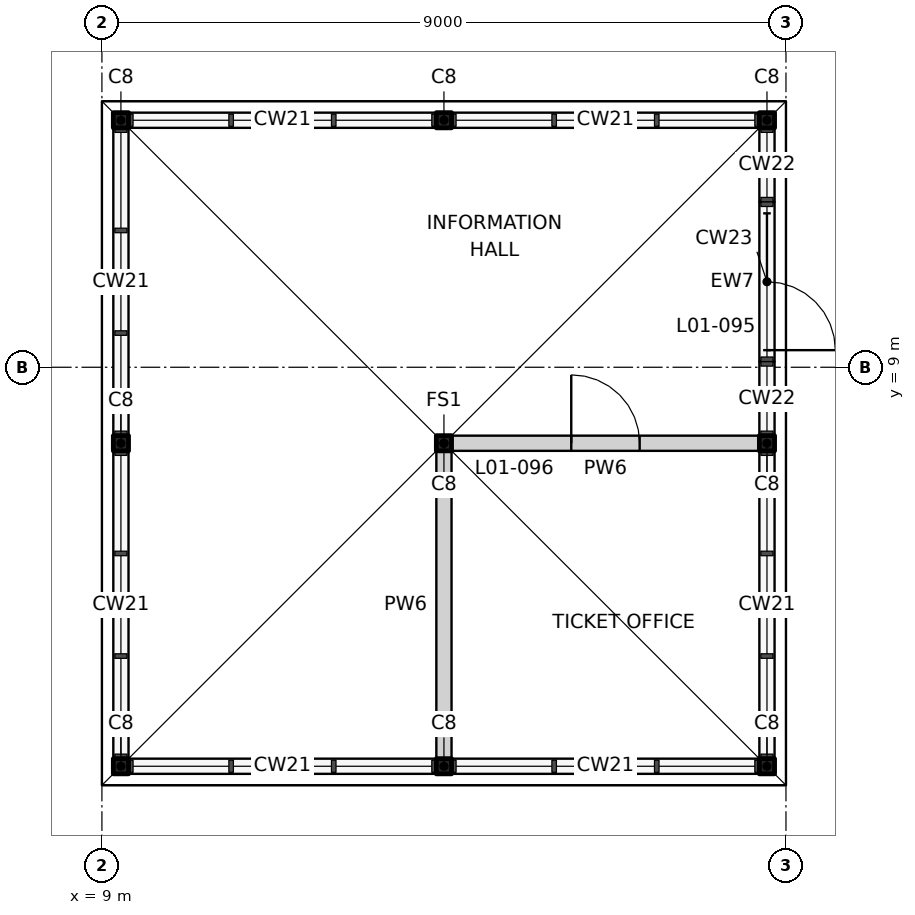
"""IFC4 building model, lengths in metres.
Left out: names, types, materials, properties, quantities, classifications, styles, units other than length and angle.
Written with IfcOpenShell. Run it as: python <this file> out.ifc"""

import sys

from ifc_helpers import new_model, si_unit, direction, frame, frame_2d, origin, origin_2d, place, context, subcontext, project, spatial, rectangle, hollow_rectangle, extrude, element, fill, save


model = new_model("IFC4")
c1 = context("Model", 3, precision=1e-05, world=origin(), true_north=direction((0.0, 1.0)))
c2 = subcontext(c1, "Body", "Model", "MODEL_VIEW")
j1 = project(units=[si_unit("LENGTHUNIT", "METRE"), si_unit("PLANEANGLEUNIT", "RADIAN")], contexts=[c1])
p1 = place(None, origin())
s1 = spatial("IfcSite", under=j1, at=p1, CompositionType="ELEMENT")
p2 = place(p1, origin())
s2 = spatial("IfcBuilding", under=s1, at=p2, CompositionType="ELEMENT")
p3 = place(p2, frame((0.0, 0.0, 7.0)))
s3 = spatial("IfcBuildingStorey", under=s2, at=p3, CompositionType="ELEMENT", Elevation=7.0)
for number, where, z_axis, x_axis in (
    (1, (9.25, 3.75, 0.0), (0.0, 0.0, 1.0), (1.0, 0.0, 0.0)),
    (2, (9.25, 8.0, 0.0), (0.0, 0.0, 1.0), (1.0, 0.0, 0.0)),
    (3, (9.25, 12.25, 0.0), (0.0, 0.0, 1.0), (1.0, 0.0, 0.0)),
    (4, (13.5, 3.75, 0.0), (0.0, 0.0, 1.0), (1.0, 0.0, 0.0)),
    (5, (13.5, 8.0, 0.0), (0.0, 0.0, 1.0), (1.0, 0.0, 0.0)),
    (6, (13.5, 12.25, 0.0), (0.0, 0.0, 1.0), (1.0, 0.0, 0.0)),
    (7, (17.75, 3.75, 0.0), (0.0, 0.0, 1.0), (1.0, 0.0, 0.0)),
    (8, (17.75, 8.0, 0.0), (0.0, 0.0, 1.0), (1.0, 0.0, 0.0)),
    (9, (17.75, 12.25, 0.0), (0.0, 0.0, 1.0), (1.0, 0.0, 0.0)),
):
    element("IfcColumn", number, at=place(p3, frame(where, z_axis=z_axis, x_axis=x_axis)), inside=s3, PredefinedType="COLUMN", context=c2, shape_type="SweptSolid", body=[
        extrude(hollow_rectangle(XDim=0.2, YDim=0.2, WallThickness=0.01, at=origin_2d()), origin(), (0.0, 0.0, 1.0), 4.15),
    ])
p4 = place(p3, frame((17.75, 9.075, 0.0), z_axis=(0.0, 0.0, 1.0), x_axis=(0.0, 1.0, 0.0)))
e10 = element("IfcWall", 10, at=p4, inside=s3, PredefinedType="SOLIDWALL", context=c2, shape_type="SweptSolid", body=[
    extrude(rectangle(XDim=2.1, YDim=0.1, at=frame_2d((1.05, 0.0))), origin(), (0.0, 0.0, 1.0), 2.8),
])
p5 = place(p4, frame((0.15, 0.0, 0.0)))
e11 = element("IfcOpeningElement", 11, at=p5, cuts=e10, PredefinedType="OPENING", context=c2, shape_type="SweptSolid", body=[
    extrude(rectangle(XDim=1.8, YDim=2.4, at=frame_2d((0.9, 1.2))), frame((0.0, 0.06, 0.0), z_axis=(0.0, -1.0, 0.0), x_axis=(1.0, 0.0, 0.0)), (0.0, 0.0, 1.0), 0.12),
])
p6 = place(p3, frame((13.5, 3.85, 0.0), z_axis=(0.0, 0.0, 1.0), x_axis=(0.0, 1.0, 0.0)))
e12 = element("IfcWall", 12, at=p6, inside=s3, PredefinedType="PARTITIONING", context=c2, shape_type="SweptSolid", body=[
    extrude(rectangle(XDim=4.05, YDim=0.2, at=frame_2d((2.025, 0.0))), origin(), (0.0, 0.0, 1.0), 4.15),
])
p7 = place(p3, frame((13.6, 8.0, 0.0), z_axis=(0.0, 0.0, 1.0), x_axis=(1.0, 0.0, 0.0)))
e13 = element("IfcWall", 13, at=p7, inside=s3, PredefinedType="PARTITIONING", context=c2, shape_type="SweptSolid", body=[
    extrude(rectangle(XDim=4.05, YDim=0.2, at=frame_2d((2.025, 0.0))), origin(), (0.0, 0.0, 1.0), 4.15),
])
p8 = place(p7, frame((1.575, 0.0, 0.0)))
e14 = element("IfcOpeningElement", 14, at=p8, cuts=e13, PredefinedType="OPENING", context=c2, shape_type="SweptSolid", body=[
    extrude(rectangle(XDim=0.9, YDim=2.1, at=frame_2d((0.45, 1.05))), frame((0.0, 0.11, 0.0), z_axis=(0.0, -1.0, 0.0), x_axis=(1.0, 0.0, 0.0)), (0.0, 0.0, 1.0), 0.22),
])
p9 = place(p5, frame((1.8, 0.0, 0.0), z_axis=(0.0, 0.0, 1.0), x_axis=(-1.0, 0.0, 0.0)))
e15 = element("IfcDoor", 15, at=p9, inside=s3, OperationType="DOUBLE_DOOR_SINGLE_SWING", PredefinedType="DOOR", context=c2, shape_type="SweptSolid", body=[
    extrude(rectangle(XDim=1.8, YDim=2.4, at=frame_2d((0.9, 1.2))), frame((0.0, 0.025, 0.0), z_axis=(0.0, -1.0, 0.0), x_axis=(1.0, 0.0, 0.0)), (0.0, 0.0, 1.0), 0.05),
])
fill(e11, e15)
p10 = place(p8, origin())
e16 = element("IfcDoor", 16, at=p10, inside=s3, OperationType="SINGLE_SWING_LEFT", PredefinedType="DOOR", context=c2, shape_type="SweptSolid", body=[
    extrude(rectangle(XDim=0.9, YDim=2.1, at=frame_2d((0.45, 1.05))), frame((0.0, 0.025, 0.0), z_axis=(0.0, -1.0, 0.0), x_axis=(1.0, 0.0, 0.0)), (0.0, 0.0, 1.0), 0.05),
])
fill(e14, e16)
save(model, sys.argv[1])
